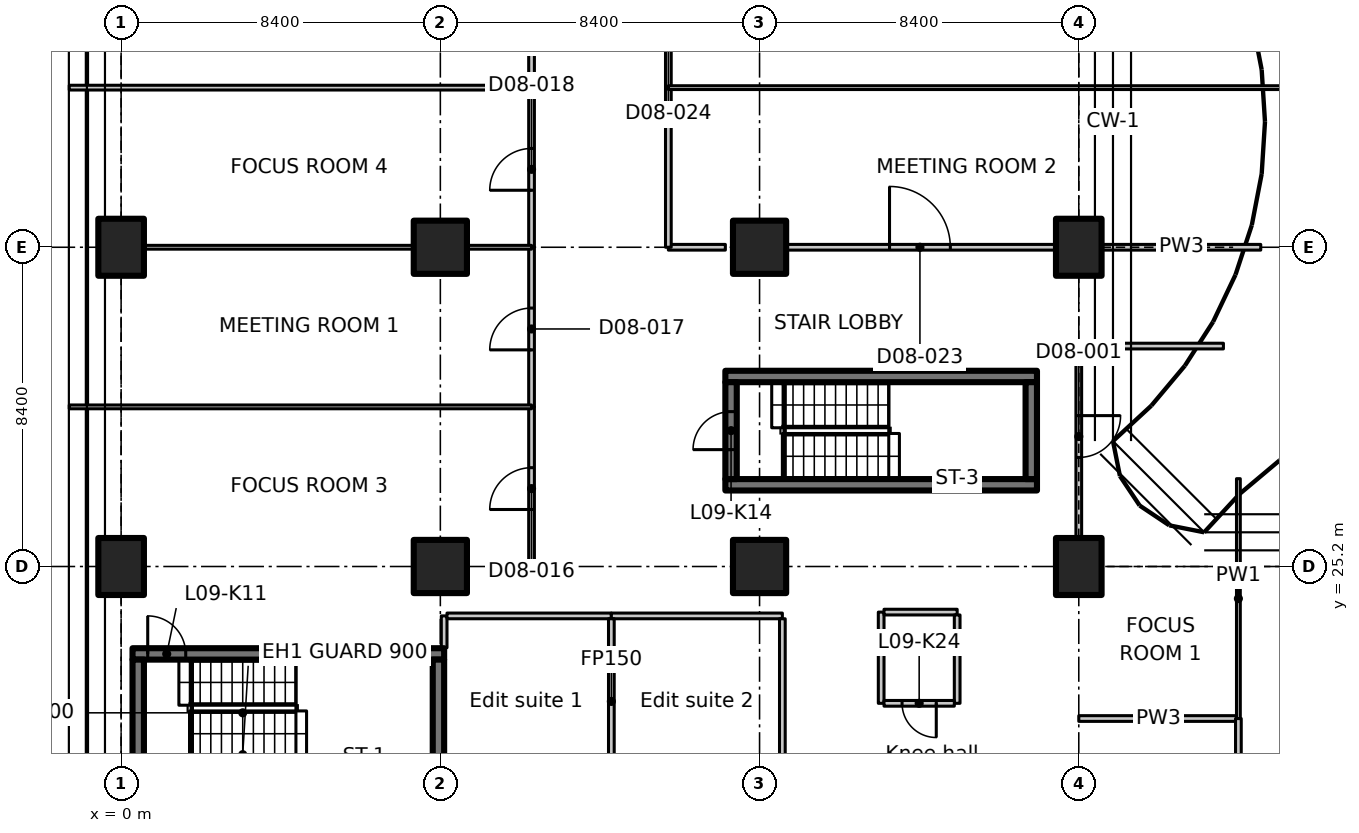
"""IFC4 building model, lengths in metres.
Left out: names, types, materials, properties, quantities, classifications, styles, units other than length and angle.
Written with IfcOpenShell. Run it as: python <this file> out.ifc"""

import sys

from ifc_helpers import new_model, si_unit, direction, frame, frame_2d, origin, origin_2d, place, context, subcontext, project, spatial, polyline, rectangle, outline, extrude, element, fill, save


model = new_model("IFC4")
c1 = context("Model", 3, precision=1e-05, world=origin(), true_north=direction((0.0, 1.0)))
c2 = subcontext(c1, "Body", "Model", "MODEL_VIEW")
j1 = project(units=[si_unit("LENGTHUNIT", "METRE"), si_unit("PLANEANGLEUNIT", "RADIAN")], contexts=[c1])
p1 = place(None, origin())
s1 = spatial("IfcSite", under=j1, at=p1, CompositionType="ELEMENT")
p2 = place(p1, origin())
s2 = spatial("IfcBuilding", under=s1, at=p2, CompositionType="ELEMENT")
p3 = place(p2, frame((0.0, 0.0, 47.3)))
s3 = spatial("IfcBuildingStorey", under=s2, at=p3, CompositionType="ELEMENT", Elevation=47.3)
for number, where, z_axis, x_axis in (
    (1, (0.0, 25.2, 0.0), (0.0, 0.0, 1.0), (1.0, 0.0, 0.0)),
    (2, (0.0, 33.6, 0.0), (0.0, 0.0, 1.0), (1.0, 0.0, 0.0)),
):
    element("IfcColumn", number, at=place(p3, frame(where, z_axis=z_axis, x_axis=x_axis)), inside=s3, PredefinedType="COLUMN", context=c2, shape_type="SweptSolid", body=[
        extrude(rectangle(XDim=1.2, YDim=1.5, at=origin_2d()), origin(), (0.0, 0.0, 1.0), 3.35),
    ])
for number, where, z_axis, x_axis in (
    (3, (8.4, 25.2, 0.0), (0.0, 0.0, 1.0), (1.0, 0.0, 0.0)),
    (4, (8.4, 33.6, 0.0), (0.0, 0.0, 1.0), (1.0, 0.0, 0.0)),
    (5, (16.8, 25.2, 0.0), (0.0, 0.0, 1.0), (1.0, 0.0, 0.0)),
    (6, (16.8, 33.6, 0.0), (0.0, 0.0, 1.0), (1.0, 0.0, 0.0)),
):
    element("IfcColumn", number, at=place(p3, frame(where, z_axis=z_axis, x_axis=x_axis)), inside=s3, PredefinedType="COLUMN", context=c2, shape_type="SweptSolid", body=[
        extrude(rectangle(XDim=1.4, YDim=1.4, at=origin_2d()), origin(), (0.0, 0.0, 1.0), 3.35),
    ])
for number, where, z_axis, x_axis in (
    (7, (25.2, 25.2, 0.0), (0.0, 0.0, 1.0), (1.0, 0.0, 0.0)),
    (8, (25.2, 33.6, 0.0), (0.0, 0.0, 1.0), (1.0, 0.0, 0.0)),
):
    element("IfcColumn", number, at=place(p3, frame(where, z_axis=z_axis, x_axis=x_axis)), inside=s3, PredefinedType="COLUMN", context=c2, shape_type="SweptSolid", body=[
        extrude(rectangle(XDim=1.2, YDim=1.5, at=origin_2d()), origin(), (0.0, 0.0, 1.0), 3.35),
    ])
p4 = place(p3, frame((0.3, 22.9, 0.0), z_axis=(0.0, 0.0, 1.0), x_axis=(1.0, 0.0, 0.0)))
e9 = element("IfcWall", 9, at=p4, inside=s3, PredefinedType="SHEAR", context=c2, shape_type="SweptSolid", body=[
    extrude(rectangle(XDim=8.2, YDim=0.3, at=frame_2d((4.1, 0.0))), origin(), (0.0, 0.0, 1.0), 3.35),
])
p5 = place(p4, frame((0.4, 0.0, 0.0)))
e10 = element("IfcOpeningElement", 10, at=p5, cuts=e9, PredefinedType="OPENING", context=c2, shape_type="SweptSolid", body=[
    extrude(rectangle(XDim=1.0, YDim=2.1, at=frame_2d((0.5, 1.05))), frame((0.0, 0.16, 0.0), z_axis=(0.0, -1.0, 0.0), x_axis=(1.0, 0.0, 0.0)), (0.0, 0.0, 1.0), 0.32),
])
for number, where, z_axis, x_axis in (
    (11, (0.45, 20.2, 0.0), (0.0, 0.0, 1.0), (0.0, 1.0, 0.0)),
    (12, (8.35, 20.2, 0.0), (0.0, 0.0, 1.0), (0.0, 1.0, 0.0)),
):
    element("IfcWall", number, at=place(p3, frame(where, z_axis=z_axis, x_axis=x_axis)), inside=s3, PredefinedType="SHEAR", context=c2, shape_type="SweptSolid", body=[
        extrude(rectangle(XDim=2.55, YDim=0.3, at=frame_2d((1.275, 0.0))), origin(), (0.0, 0.0, 1.0), 3.35),
    ])
for number, where, z_axis, x_axis in (
    (13, (15.9, 27.35, 0.0), (0.0, 0.0, 1.0), (1.0, 0.0, 0.0)),
    (14, (15.9, 30.2, 0.0), (0.0, 0.0, 1.0), (1.0, 0.0, 0.0)),
):
    element("IfcWall", number, at=place(p3, frame(where, z_axis=z_axis, x_axis=x_axis)), inside=s3, PredefinedType="SHEAR", context=c2, shape_type="SweptSolid", body=[
        extrude(rectangle(XDim=8.2, YDim=0.3, at=frame_2d((4.1, 0.0))), origin(), (0.0, 0.0, 1.0), 3.35),
    ])
p6 = place(p3, frame((16.05, 27.5, 0.0), z_axis=(0.0, 0.0, 1.0), x_axis=(0.0, 1.0, 0.0)))
e15 = element("IfcWall", 15, at=p6, inside=s3, PredefinedType="SHEAR", context=c2, shape_type="SweptSolid", body=[
    extrude(rectangle(XDim=2.55, YDim=0.3, at=frame_2d((1.275, 0.0))), origin(), (0.0, 0.0, 1.0), 3.35),
])
p7 = place(p6, frame((0.775, 0.0, 0.0)))
e16 = element("IfcOpeningElement", 16, at=p7, cuts=e15, PredefinedType="OPENING", context=c2, shape_type="SweptSolid", body=[
    extrude(rectangle(XDim=1.0, YDim=2.1, at=frame_2d((0.5, 1.05))), frame((0.0, 0.16, 0.0), z_axis=(0.0, -1.0, 0.0), x_axis=(1.0, 0.0, 0.0)), (0.0, 0.0, 1.0), 0.32),
])
p8 = place(p3, frame((23.95, 27.5, 0.0), z_axis=(0.0, 0.0, 1.0), x_axis=(0.0, 1.0, 0.0)))
e17 = element("IfcWall", 17, at=p8, inside=s3, PredefinedType="SHEAR", context=c2, shape_type="SweptSolid", body=[
    extrude(rectangle(XDim=2.55, YDim=0.3, at=frame_2d((1.275, 0.0))), origin(), (0.0, 0.0, 1.0), 3.35),
])
p9 = place(p3, frame((8.5, 23.062, 0.0), z_axis=(0.0, 0.0, 1.0), x_axis=(0.0, 1.0, 0.0)))
e18 = element("IfcWall", 18, at=p9, inside=s3, PredefinedType="PARTITIONING", context=c2, shape_type="SweptSolid", body=[
    extrude(rectangle(XDim=0.838, YDim=0.15, at=frame_2d((0.419, 0.0))), origin(), (0.0, 0.0, 1.0), 3.35),
])
p10 = place(p3, frame((8.575, 23.9, 0.0), z_axis=(0.0, 0.0, 1.0), x_axis=(1.0, 0.0, 0.0)))
e19 = element("IfcWall", 19, at=p10, inside=s3, PredefinedType="PARTITIONING", context=c2, shape_type="SweptSolid", body=[
    extrude(rectangle(XDim=4.325, YDim=0.15, at=frame_2d((2.163, 0.0))), origin(), (0.0, 0.0, 1.0), 3.35),
])
p11 = place(p3, frame((12.9, 23.9, 0.0), z_axis=(0.0, 0.0, 1.0), x_axis=(1.0, 0.0, 0.0)))
e20 = element("IfcWall", 20, at=p11, inside=s3, PredefinedType="PARTITIONING", context=c2, shape_type="SweptSolid", body=[
    extrude(rectangle(XDim=4.5, YDim=0.15, at=frame_2d((2.25, 0.0))), origin(), (0.0, 0.0, 1.0), 3.35),
])
p12 = place(p3, frame((17.4, 23.825, 0.0), z_axis=(0.0, 0.0, 1.0), x_axis=(0.0, -1.0, 0.0)))
e21 = element("IfcWall", 21, at=p12, inside=s3, PredefinedType="PARTITIONING", context=c2, shape_type="SweptSolid", body=[
    extrude(rectangle(XDim=4.425, YDim=0.15, at=frame_2d((2.212, 0.0))), origin(), (0.0, 0.0, 1.0), 3.35),
])
p13 = place(p3, frame((12.9, 23.825, 0.0), z_axis=(0.0, 0.0, 1.0), x_axis=(0.0, -1.0, 0.0)))
e22 = element("IfcWall", 22, at=p13, inside=s3, PredefinedType="PARTITIONING", context=c2, shape_type="SweptSolid", body=[
    extrude(rectangle(XDim=4.35, YDim=0.15, at=frame_2d((2.175, 0.0))), origin(), (0.0, 0.0, 1.0), 3.35),
])
p14 = place(p3, frame((20.0, 21.6, 0.0), z_axis=(0.0, 0.0, 1.0), x_axis=(0.0, 1.0, 0.0)))
e23 = element("IfcWall", 23, at=p14, inside=s3, PredefinedType="PARTITIONING", context=c2, shape_type="SweptSolid", body=[
    extrude(rectangle(XDim=2.4, YDim=0.15, at=frame_2d((1.2, 0.0))), origin(), (0.0, 0.0, 1.0), 3.35),
])
p15 = place(p3, frame((20.075, 24.0, 0.0), z_axis=(0.0, 0.0, 1.0), x_axis=(1.0, 0.0, 0.0)))
e24 = element("IfcWall", 24, at=p15, inside=s3, PredefinedType="PARTITIONING", context=c2, shape_type="SweptSolid", body=[
    extrude(rectangle(XDim=1.925, YDim=0.15, at=frame_2d((0.962, 0.0))), origin(), (0.0, 0.0, 1.0), 3.35),
])
p16 = place(p3, frame((22.0, 23.925, 0.0), z_axis=(0.0, 0.0, 1.0), x_axis=(0.0, -1.0, 0.0)))
e25 = element("IfcWall", 25, at=p16, inside=s3, PredefinedType="PARTITIONING", context=c2, shape_type="SweptSolid", body=[
    extrude(rectangle(XDim=2.325, YDim=0.15, at=frame_2d((1.163, 0.0))), origin(), (0.0, 0.0, 1.0), 3.35),
])
p17 = place(p3, frame((21.925, 21.6, 0.0), z_axis=(0.0, 0.0, 1.0), x_axis=(-1.0, 0.0, 0.0)))
e26 = element("IfcWall", 26, at=p17, inside=s3, PredefinedType="PARTITIONING", context=c2, shape_type="SweptSolid", body=[
    extrude(rectangle(XDim=1.85, YDim=0.15, at=frame_2d((0.925, 0.0))), origin(), (0.0, 0.0, 1.0), 3.35),
])
p18 = place(p17, frame((0.475, 0.0, 0.0)))
e27 = element("IfcOpeningElement", 27, at=p18, cuts=e26, PredefinedType="OPENING", context=c2, shape_type="SweptSolid", body=[
    extrude(rectangle(XDim=0.9, YDim=2.1, at=frame_2d((0.45, 1.05))), frame((0.0, 0.085, 0.0), z_axis=(0.0, -1.0, 0.0), x_axis=(1.0, 0.0, 0.0)), (0.0, 0.0, 1.0), 0.17),
])
p19 = place(p3, frame((25.2, 21.2, 0.0), z_axis=(0.0, 0.0, 1.0), x_axis=(1.0, 0.0, 0.0)))
e28 = element("IfcWall", 28, at=p19, inside=s3, PredefinedType="PARTITIONING", context=c2, shape_type="SweptSolid", body=[
    extrude(rectangle(XDim=4.2, YDim=0.15, at=frame_2d((2.1, 0.0))), origin(), (0.0, 0.0, 1.0), 3.33),
])
p20 = place(p3, frame((29.4, 21.2, 0.0), z_axis=(0.0, 0.0, 1.0), x_axis=(0.0, -1.0, 0.0)))
e29 = element("IfcWall", 29, at=p20, inside=s3, PredefinedType="PARTITIONING", context=c2, shape_type="SweptSolid", body=[
    extrude(rectangle(XDim=8.2, YDim=0.15, at=frame_2d((4.1, 0.0))), origin(), (0.0, 0.0, 1.0), 3.33),
])
p21 = place(p3, frame((29.4, 27.511, 0.0), z_axis=(0.0, 0.0, 1.0), x_axis=(0.0, -1.0, 0.0)))
e30 = element("IfcWall", 30, at=p21, inside=s3, PredefinedType="PARTITIONING", context=c2, shape_type="SweptSolid", body=[
    extrude(outline(polyline([(0.0, 0.0), (6.311, 0.0), (6.311, 3.33), (2.761, 3.33), (2.759, 2.98), (1.863, 2.98), (1.861, 3.33), (0.236, 3.33), (0.0, 3.33), (0.0, 0.0)])), frame((0.0, 0.05, 0.0), z_axis=(0.0, -1.0, 0.0), x_axis=(1.0, 0.0, 0.0)), (0.0, 0.0, 1.0), 0.1),
])
p22 = place(p3, frame((25.2, 31.0, 0.0), z_axis=(0.0, 0.0, 1.0), x_axis=(0.0, -1.0, 0.0)))
e31 = element("IfcWall", 31, at=p22, inside=s3, PredefinedType="PARTITIONING", context=c2, shape_type="SweptSolid", body=[
    extrude(outline(polyline([(0.0, 0.0), (5.03, 0.0), (5.03, 2.98), (0.0, 2.98), (0.0, 0.0)])), frame((0.0, 0.075, 0.0), z_axis=(0.0, -1.0, 0.0), x_axis=(1.0, 0.0, 0.0)), (0.0, 0.0, 1.0), 0.15),
])
p23 = place(p22, frame((1.83, 0.0, 0.0)))
e32 = element("IfcOpeningElement", 32, at=p23, cuts=e31, PredefinedType="OPENING", context=c2, shape_type="SweptSolid", body=[
    extrude(rectangle(XDim=1.1, YDim=2.1, at=frame_2d((0.55, 1.05))), frame((0.0, 0.085, 0.0), z_axis=(0.0, -1.0, 0.0), x_axis=(1.0, 0.0, 0.0)), (0.0, 0.0, 1.0), 0.17),
])
p24 = place(p3, frame((25.2, 31.0, 0.0), z_axis=(0.0, 0.0, 1.0), x_axis=(1.0, 0.0, 0.0)))
e33 = element("IfcWall", 33, at=p24, inside=s3, PredefinedType="PARTITIONING", context=c2, shape_type="SweptSolid", body=[
    extrude(rectangle(XDim=3.806, YDim=0.15, at=frame_2d((1.903, 0.0))), origin(), (0.0, 0.0, 1.0), 2.98),
])
p25 = place(p3, frame((10.8, 25.2, 0.0), z_axis=(0.0, 0.0, 1.0), x_axis=(0.0, 1.0, 0.0)))
e34 = element("IfcWall", 34, at=p25, inside=s3, PredefinedType="PARTITIONING", context=c2, shape_type="SweptSolid", body=[
    extrude(rectangle(XDim=4.2, YDim=0.15, at=frame_2d((2.1, 0.0))), origin(), (0.0, 0.0, 1.0), 3.33),
])
p26 = place(p25, frame((1.5, 0.0, 0.0)))
e35 = element("IfcOpeningElement", 35, at=p26, cuts=e34, PredefinedType="OPENING", context=c2, shape_type="SweptSolid", body=[
    extrude(rectangle(XDim=1.1, YDim=2.1, at=frame_2d((0.55, 1.05))), frame((0.0, 0.085, 0.0), z_axis=(0.0, -1.0, 0.0), x_axis=(1.0, 0.0, 0.0)), (0.0, 0.0, 1.0), 0.17),
])
p27 = place(p3, frame((10.8, 29.4, 0.0), z_axis=(0.0, 0.0, 1.0), x_axis=(0.0, 1.0, 0.0)))
e36 = element("IfcWall", 36, at=p27, inside=s3, PredefinedType="PARTITIONING", context=c2, shape_type="SweptSolid", body=[
    extrude(rectangle(XDim=4.2, YDim=0.15, at=frame_2d((2.1, 0.0))), origin(), (0.0, 0.0, 1.0), 3.33),
])
p28 = place(p27, frame((1.5, 0.0, 0.0)))
e37 = element("IfcOpeningElement", 37, at=p28, cuts=e36, PredefinedType="OPENING", context=c2, shape_type="SweptSolid", body=[
    extrude(rectangle(XDim=1.1, YDim=2.1, at=frame_2d((0.55, 1.05))), frame((0.0, 0.085, 0.0), z_axis=(0.0, -1.0, 0.0), x_axis=(1.0, 0.0, 0.0)), (0.0, 0.0, 1.0), 0.17),
])
p29 = place(p3, frame((14.4, 33.6, 0.0), z_axis=(0.0, 0.0, 1.0), x_axis=(1.0, 0.0, 0.0)))
e38 = element("IfcWall", 38, at=p29, inside=s3, PredefinedType="PARTITIONING", context=c2, shape_type="SweptSolid", body=[
    extrude(rectangle(XDim=1.5, YDim=0.15, at=frame_2d((0.75, 0.0))), origin(), (0.0, 0.0, 1.0), 3.33),
])
p30 = place(p3, frame((17.52, 33.6, 0.0), z_axis=(0.0, 0.0, 1.0), x_axis=(1.0, 0.0, 0.0)))
e39 = element("IfcWall", 39, at=p30, inside=s3, PredefinedType="PARTITIONING", context=c2, shape_type="SweptSolid", body=[
    extrude(rectangle(XDim=7.06, YDim=0.15, at=frame_2d((3.53, 0.0))), origin(), (0.0, 0.0, 1.0), 3.33),
])
p31 = place(p30, frame((2.7, 0.0, 0.0)))
e40 = element("IfcOpeningElement", 40, at=p31, cuts=e39, PredefinedType="OPENING", context=c2, shape_type="SweptSolid", body=[
    extrude(rectangle(XDim=1.6, YDim=2.1, at=frame_2d((0.8, 1.05))), frame((0.0, 0.085, 0.0), z_axis=(0.0, -1.0, 0.0), x_axis=(1.0, 0.0, 0.0)), (0.0, 0.0, 1.0), 0.17),
])
p32 = place(p3, frame((25.82, 33.6, 0.0), z_axis=(0.0, 0.0, 1.0), x_axis=(1.0, 0.0, 0.0)))
e41 = element("IfcWall", 41, at=p32, inside=s3, PredefinedType="PARTITIONING", context=c2, shape_type="SweptSolid", body=[
    extrude(rectangle(XDim=4.168, YDim=0.15, at=frame_2d((2.084, 0.0))), origin(), (0.0, 0.0, 1.0), 2.98),
])
p33 = place(p3, frame((10.8, 33.6, 0.0), z_axis=(0.0, 0.0, 1.0), x_axis=(0.0, 1.0, 0.0)))
e42 = element("IfcWall", 42, at=p33, inside=s3, PredefinedType="PARTITIONING", context=c2, shape_type="SweptSolid", body=[
    extrude(rectangle(XDim=4.2, YDim=0.15, at=frame_2d((2.1, 0.0))), origin(), (0.0, 0.0, 1.0), 3.33),
])
p34 = place(p33, frame((1.5, 0.0, 0.0)))
e43 = element("IfcOpeningElement", 43, at=p34, cuts=e42, PredefinedType="OPENING", context=c2, shape_type="SweptSolid", body=[
    extrude(rectangle(XDim=1.1, YDim=2.1, at=frame_2d((0.55, 1.05))), frame((0.0, 0.085, 0.0), z_axis=(0.0, -1.0, 0.0), x_axis=(1.0, 0.0, 0.0)), (0.0, 0.0, 1.0), 0.17),
])
p35 = place(p3, frame((10.8, 37.8, 0.0), z_axis=(0.0, 0.0, 1.0), x_axis=(0.0, 1.0, 0.0)))
e44 = element("IfcWall", 44, at=p35, inside=s3, PredefinedType="PARTITIONING", context=c2, shape_type="SweptSolid", body=[
    extrude(rectangle(XDim=8.4, YDim=0.15, at=frame_2d((4.2, 0.0))), origin(), (0.0, 0.0, 1.0), 3.33),
])
p36 = place(p35, frame((3.3, 0.0, 0.0)))
e45 = element("IfcOpeningElement", 45, at=p36, cuts=e44, PredefinedType="OPENING", context=c2, shape_type="SweptSolid", body=[
    extrude(rectangle(XDim=1.6, YDim=2.1, at=frame_2d((0.8, 1.05))), frame((0.0, 0.085, 0.0), z_axis=(0.0, -1.0, 0.0), x_axis=(1.0, 0.0, 0.0)), (0.0, 0.0, 1.0), 0.17),
])
p37 = place(p3, frame((14.4, 37.8, 0.0), z_axis=(0.0, 0.0, 1.0), x_axis=(0.0, -1.0, 0.0)))
e46 = element("IfcWall", 46, at=p37, inside=s3, PredefinedType="PARTITIONING", context=c2, shape_type="SweptSolid", body=[
    extrude(rectangle(XDim=4.2, YDim=0.15, at=frame_2d((2.1, 0.0))), origin(), (0.0, 0.0, 1.0), 3.33),
])
p38 = place(p3, frame((14.4, 42.0, 0.0), z_axis=(0.0, 0.0, 1.0), x_axis=(0.0, -1.0, 0.0)))
e47 = element("IfcWall", 47, at=p38, inside=s3, PredefinedType="PARTITIONING", context=c2, shape_type="SweptSolid", body=[
    extrude(rectangle(XDim=4.2, YDim=0.15, at=frame_2d((2.1, 0.0))), origin(), (0.0, 0.0, 1.0), 3.33),
])
p39 = place(p38, frame((1.2, 0.0, 0.0)))
e48 = element("IfcOpeningElement", 48, at=p39, cuts=e47, PredefinedType="OPENING", context=c2, shape_type="SweptSolid", body=[
    extrude(rectangle(XDim=1.6, YDim=2.1, at=frame_2d((0.8, 1.05))), frame((0.0, 0.085, 0.0), z_axis=(0.0, -1.0, 0.0), x_axis=(1.0, 0.0, 0.0)), (0.0, 0.0, 1.0), 0.17),
])
p40 = place(p3, frame((-1.365, 29.4, 0.0), z_axis=(0.0, 0.0, 1.0), x_axis=(1.0, 0.0, 0.0)))
e49 = element("IfcWall", 49, at=p40, inside=s3, PredefinedType="PARTITIONING", context=c2, shape_type="SweptSolid", body=[
    extrude(outline(polyline([(0.0, 0.0), (12.165, 0.0), (12.165, 3.33), (1.815, 3.33), (1.813, 2.98), (0.917, 2.98), (0.915, 3.33), (0.265, 3.33), (0.0, 3.33), (0.0, 0.0)])), frame((0.0, 0.05, 0.0), z_axis=(0.0, -1.0, 0.0), x_axis=(1.0, 0.0, 0.0)), (0.0, 0.0, 1.0), 0.1),
])
p41 = place(p3, frame((0.62, 33.6, 0.0), z_axis=(0.0, 0.0, 1.0), x_axis=(1.0, 0.0, 0.0)))
e50 = element("IfcWall", 50, at=p41, inside=s3, PredefinedType="PARTITIONING", context=c2, shape_type="SweptSolid", body=[
    extrude(rectangle(XDim=7.06, YDim=0.1, at=frame_2d((3.53, 0.0))), origin(), (0.0, 0.0, 1.0), 3.33),
])
p42 = place(p3, frame((9.12, 33.6, 0.0), z_axis=(0.0, 0.0, 1.0), x_axis=(1.0, 0.0, 0.0)))
e51 = element("IfcWall", 51, at=p42, inside=s3, PredefinedType="PARTITIONING", context=c2, shape_type="SweptSolid", body=[
    extrude(rectangle(XDim=1.68, YDim=0.1, at=frame_2d((0.84, 0.0))), origin(), (0.0, 0.0, 1.0), 3.33),
])
p43 = place(p3, frame((-1.365, 37.8, 0.0), z_axis=(0.0, 0.0, 1.0), x_axis=(1.0, 0.0, 0.0)))
e52 = element("IfcWall", 52, at=p43, inside=s3, PredefinedType="PARTITIONING", context=c2, shape_type="SweptSolid", body=[
    extrude(outline(polyline([(0.0, 0.0), (12.165, 0.0), (12.165, 3.33), (1.815, 3.33), (1.813, 2.98), (0.917, 2.98), (0.915, 3.33), (0.265, 3.33), (0.0, 3.33), (0.0, 0.0)])), frame((0.0, 0.062, 0.0), z_axis=(0.0, -1.0, 0.0), x_axis=(1.0, 0.0, 0.0)), (0.0, 0.0, 1.0), 0.125),
])
p44 = place(p3, frame((14.4, 37.8, 0.0), z_axis=(0.0, 0.0, 1.0), x_axis=(1.0, 0.0, 0.0)))
e53 = element("IfcWall", 53, at=p44, inside=s3, PredefinedType="PARTITIONING", context=c2, shape_type="SweptSolid", body=[
    extrude(outline(polyline([(0.0, 0.0), (16.126, 0.0), (16.126, 3.33), (15.843, 3.33), (11.25, 3.33), (11.248, 2.98), (10.352, 2.98), (10.35, 3.33), (0.0, 3.33), (0.0, 0.0)])), frame((0.0, 0.05, 0.0), z_axis=(0.0, -1.0, 0.0), x_axis=(1.0, 0.0, 0.0)), (0.0, 0.0, 1.0), 0.1),
])
p45 = place(p5, origin())
e54 = element("IfcDoor", 54, at=p45, inside=s3, OperationType="SINGLE_SWING_RIGHT", PredefinedType="DOOR", context=c2, shape_type="SweptSolid", body=[
    extrude(rectangle(XDim=1.0, YDim=2.1, at=frame_2d((0.5, 1.05))), frame((0.0, 0.025, 0.0), z_axis=(0.0, -1.0, 0.0), x_axis=(1.0, 0.0, 0.0)), (0.0, 0.0, 1.0), 0.05),
])
fill(e10, e54)
p46 = place(p7, origin())
e55 = element("IfcDoor", 55, at=p46, inside=s3, OperationType="SINGLE_SWING_LEFT", PredefinedType="DOOR", context=c2, shape_type="SweptSolid", body=[
    extrude(rectangle(XDim=1.0, YDim=2.1, at=frame_2d((0.5, 1.05))), frame((0.0, 0.025, 0.0), z_axis=(0.0, -1.0, 0.0), x_axis=(1.0, 0.0, 0.0)), (0.0, 0.0, 1.0), 0.05),
])
fill(e16, e55)
p47 = place(p18, origin())
e56 = element("IfcDoor", 56, at=p47, inside=s3, OperationType="SINGLE_SWING_LEFT", PredefinedType="DOOR", context=c2, shape_type="SweptSolid", body=[
    extrude(rectangle(XDim=0.9, YDim=2.1, at=frame_2d((0.45, 1.05))), frame((0.0, 0.025, 0.0), z_axis=(0.0, -1.0, 0.0), x_axis=(1.0, 0.0, 0.0)), (0.0, 0.0, 1.0), 0.05),
])
fill(e27, e56)
p48 = place(p23, origin())
e57 = element("IfcDoor", 57, at=p48, inside=s3, OperationType="SINGLE_SWING_RIGHT", PredefinedType="DOOR", context=c2, shape_type="SweptSolid", body=[
    extrude(rectangle(XDim=1.1, YDim=2.1, at=frame_2d((0.55, 1.05))), frame((0.0, 0.025, 0.0), z_axis=(0.0, -1.0, 0.0), x_axis=(1.0, 0.0, 0.0)), (0.0, 0.0, 1.0), 0.05),
])
fill(e32, e57)
p49 = place(p26, origin())
e58 = element("IfcDoor", 58, at=p49, inside=s3, OperationType="SINGLE_SWING_LEFT", PredefinedType="DOOR", context=c2, shape_type="SweptSolid", body=[
    extrude(rectangle(XDim=1.1, YDim=2.1, at=frame_2d((0.55, 1.05))), frame((0.0, 0.025, 0.0), z_axis=(0.0, -1.0, 0.0), x_axis=(1.0, 0.0, 0.0)), (0.0, 0.0, 1.0), 0.05),
])
fill(e35, e58)
p50 = place(p28, origin())
e59 = element("IfcDoor", 59, at=p50, inside=s3, OperationType="SINGLE_SWING_LEFT", PredefinedType="DOOR", context=c2, shape_type="SweptSolid", body=[
    extrude(rectangle(XDim=1.1, YDim=2.1, at=frame_2d((0.55, 1.05))), frame((0.0, 0.025, 0.0), z_axis=(0.0, -1.0, 0.0), x_axis=(1.0, 0.0, 0.0)), (0.0, 0.0, 1.0), 0.05),
])
fill(e37, e59)
p51 = place(p34, origin())
e60 = element("IfcDoor", 60, at=p51, inside=s3, OperationType="SINGLE_SWING_LEFT", PredefinedType="DOOR", context=c2, shape_type="SweptSolid", body=[
    extrude(rectangle(XDim=1.1, YDim=2.1, at=frame_2d((0.55, 1.05))), frame((0.0, 0.025, 0.0), z_axis=(0.0, -1.0, 0.0), x_axis=(1.0, 0.0, 0.0)), (0.0, 0.0, 1.0), 0.05),
])
fill(e43, e60)
p52 = place(p31, origin())
e61 = element("IfcDoor", 61, at=p52, inside=s3, OperationType="DOUBLE_DOOR_SINGLE_SWING", PredefinedType="DOOR", context=c2, shape_type="SweptSolid", body=[
    extrude(rectangle(XDim=1.6, YDim=2.1, at=frame_2d((0.8, 1.05))), frame((0.0, 0.025, 0.0), z_axis=(0.0, -1.0, 0.0), x_axis=(1.0, 0.0, 0.0)), (0.0, 0.0, 1.0), 0.05),
])
fill(e40, e61)
save(model, sys.argv[1])
